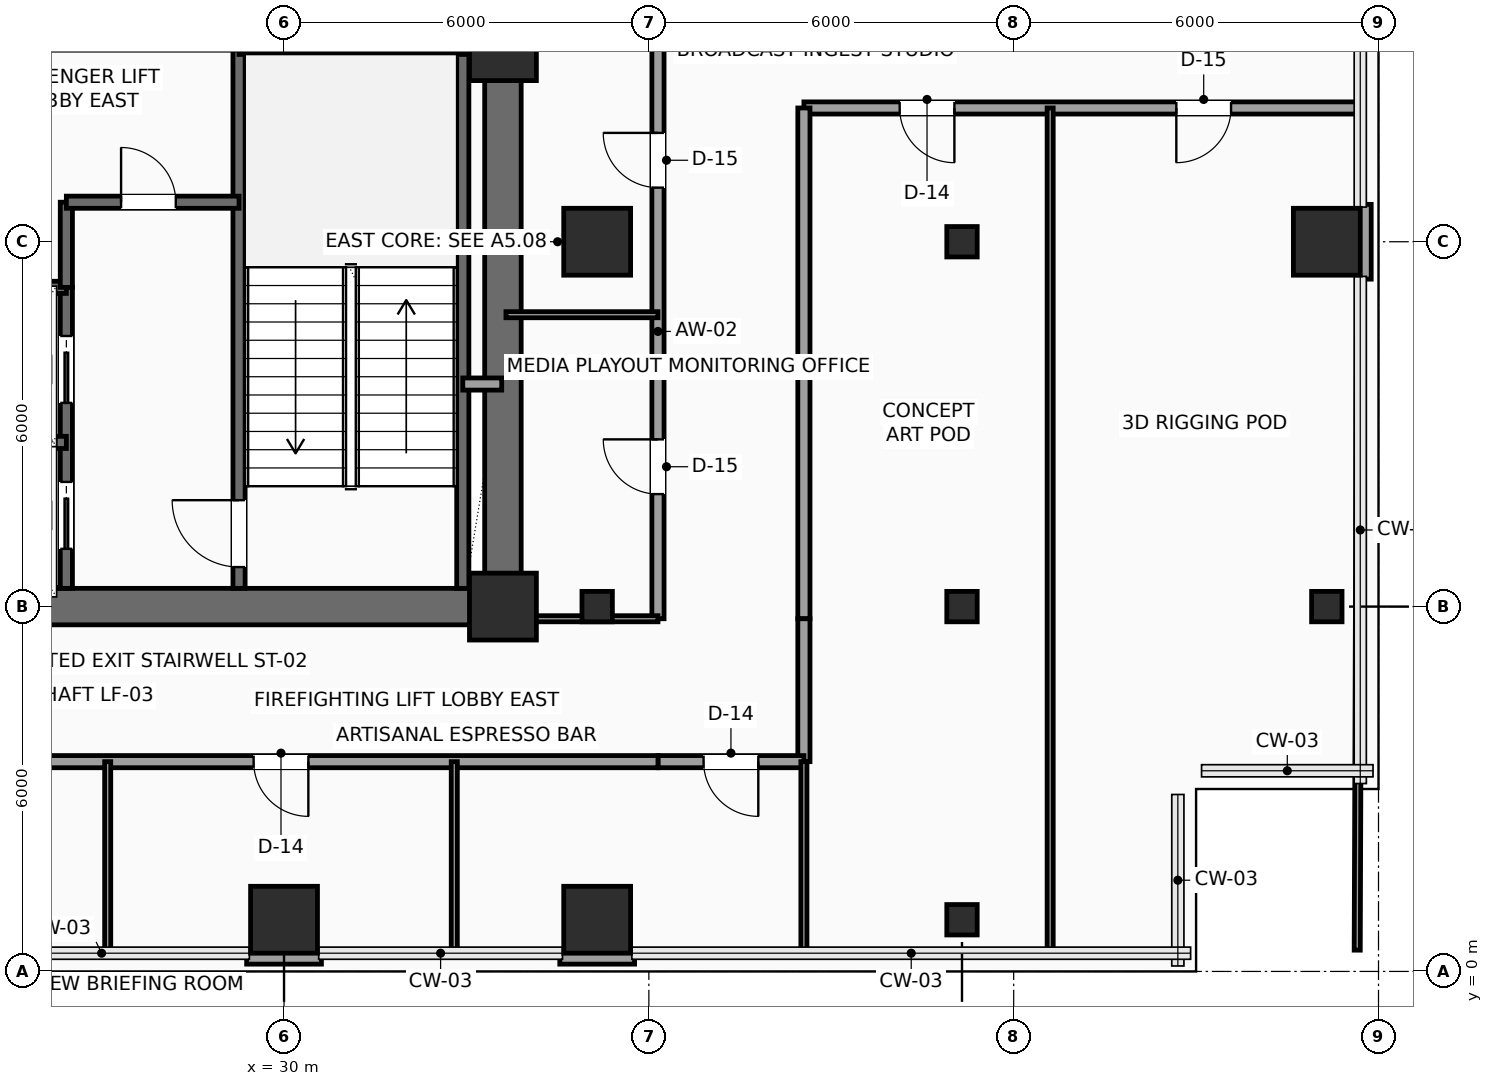
"""IFC4 building model, lengths in metres.
Left out: names, types, materials, properties, quantities, classifications, styles, units other than length and angle.
Written with IfcOpenShell. Run it as: python <this file> out.ifc"""

import sys

from ifc_helpers import new_model, si_unit, direction, frame, frame_2d, origin, origin_2d, place, context, subcontext, project, spatial, rectangle, hollow_rectangle, extrude, element, fill, save


model = new_model("IFC4")
c1 = context("Model", 3, precision=1e-05, world=origin(), true_north=direction((0.0, 1.0)))
c2 = subcontext(c1, "Body", "Model", "MODEL_VIEW")
j1 = project(units=[si_unit("LENGTHUNIT", "METRE"), si_unit("PLANEANGLEUNIT", "RADIAN")], contexts=[c1])
p1 = place(None, origin())
s1 = spatial("IfcSite", under=j1, at=p1, CompositionType="ELEMENT")
p2 = place(p1, origin())
s2 = spatial("IfcBuilding", under=s1, at=p2, CompositionType="ELEMENT")
p3 = place(p2, frame((0.0, 0.0, 141.9)))
s3 = spatial("IfcBuildingStorey", under=s2, at=p3, CompositionType="ELEMENT", Elevation=141.9)
for number, where, z_axis, x_axis in (
    (1, (33.6, 6.0, 0.0), (0.0, 0.0, 1.0), (1.0, 0.0, 0.0)),
    (2, (33.6, 15.2, 0.0), (0.0, 0.0, 1.0), (1.0, 0.0, 0.0)),
    (3, (30.0, 0.85, 0.0), (0.0, 0.0, 1.0), (1.0, 0.0, 0.0)),
    (4, (35.15, 0.85, 0.0), (0.0, 0.0, 1.0), (1.0, 0.0, 0.0)),
):
    element("IfcColumn", number, at=place(p3, frame(where, z_axis=z_axis, x_axis=x_axis)), inside=s3, PredefinedType="COLUMN", context=c2, shape_type="SweptSolid", body=[
        extrude(rectangle(XDim=1.1, YDim=1.1, at=origin_2d()), origin(), (0.0, 0.0, 1.0), 3.75),
    ])
p4 = place(p3, frame((35.15, 6.0, 0.0), z_axis=(0.0, 0.0, 1.0), x_axis=(1.0, 0.0, 0.0)))
e5 = element("IfcColumn", 5, at=p4, inside=s3, PredefinedType="COLUMN", context=c2, shape_type="SweptSolid", body=[
    extrude(hollow_rectangle(XDim=0.5, YDim=0.5, WallThickness=0.025, InnerFilletRadius=0.025, OuterFilletRadius=0.04, at=origin_2d()), origin(), (0.0, 0.0, 1.0), 3.75),
])
p5 = place(p3, frame((35.15, 12.0, 0.0), z_axis=(0.0, 0.0, 1.0), x_axis=(1.0, 0.0, 0.0)))
e6 = element("IfcColumn", 6, at=p5, inside=s3, PredefinedType="COLUMN", context=c2, shape_type="SweptSolid", body=[
    extrude(rectangle(XDim=1.1, YDim=1.1, at=origin_2d()), origin(), (0.0, 0.0, 1.0), 3.75),
])
for number, where, z_axis, x_axis in (
    (7, (41.15, 0.85, 0.0), (0.0, 0.0, 1.0), (1.0, 0.0, 0.0)),
    (8, (41.15, 6.0, 0.0), (0.0, 0.0, 1.0), (1.0, 0.0, 0.0)),
    (9, (41.15, 12.0, 0.0), (0.0, 0.0, 1.0), (1.0, 0.0, 0.0)),
    (10, (47.15, 6.0, 0.0), (0.0, 0.0, 1.0), (1.0, 0.0, 0.0)),
):
    element("IfcColumn", number, at=place(p3, frame(where, z_axis=z_axis, x_axis=x_axis)), inside=s3, PredefinedType="COLUMN", context=c2, shape_type="SweptSolid", body=[
        extrude(hollow_rectangle(XDim=0.5, YDim=0.5, WallThickness=0.025, InnerFilletRadius=0.025, OuterFilletRadius=0.04, at=origin_2d()), origin(), (0.0, 0.0, 1.0), 3.75),
    ])
p6 = place(p3, frame((47.15, 12.0, 0.0), z_axis=(0.0, 0.0, 1.0), x_axis=(1.0, 0.0, 0.0)))
e11 = element("IfcColumn", 11, at=p6, inside=s3, PredefinedType="COLUMN", context=c2, shape_type="SweptSolid", body=[
    extrude(rectangle(XDim=1.1, YDim=1.1, at=origin_2d()), origin(), (0.0, 0.0, 1.0), 3.75),
])
for number, where, z_axis, x_axis in (
    (12, (47.76, 12.615, 0.0), (0.0, 0.0, 1.0), (0.0, -1.0, 0.0)),
    (13, (35.765, 0.24, 0.0), (0.0, 0.0, 1.0), (-1.0, 0.0, 0.0)),
    (14, (30.615, 0.24, 0.0), (0.0, 0.0, 1.0), (-1.0, 0.0, 0.0)),
):
    element("IfcWall", number, at=place(p3, frame(where, z_axis=z_axis, x_axis=x_axis)), inside=s3, PredefinedType="SOLIDWALL", context=c2, shape_type="SweptSolid", body=[
        extrude(rectangle(XDim=1.23, YDim=0.24, at=frame_2d((0.615, 0.0))), origin(), (0.0, 0.0, 1.0), 3.525),
    ])
p7 = place(p3, frame((24.0, 6.0, 0.0), z_axis=(0.0, 0.0, 1.0), x_axis=(1.0, 0.0, 0.0)))
e15 = element("IfcWall", 15, at=p7, inside=s3, PredefinedType="SHEAR", context=c2, shape_type="SweptSolid", body=[
    extrude(rectangle(XDim=9.6, YDim=0.6, at=frame_2d((4.8, 0.0))), origin(), (0.0, 0.0, 1.0), 3.525),
])
p8 = place(p3, frame((33.6, 6.0, 0.0), z_axis=(0.0, 0.0, 1.0), x_axis=(0.0, 1.0, 0.0)))
e16 = element("IfcWall", 16, at=p8, inside=s3, PredefinedType="SHEAR", context=c2, shape_type="SweptSolid", body=[
    extrude(rectangle(XDim=12.0, YDim=0.6, at=frame_2d((6.0, 0.0))), origin(), (0.0, 0.0, 1.0), 3.525),
])
p9 = place(p8, frame((10.15, 0.0, 0.0)))
e17 = element("IfcOpeningElement", 17, at=p9, cuts=e16, PredefinedType="OPENING", context=c2, shape_type="SweptSolid", body=[
    extrude(rectangle(XDim=0.9, YDim=2.15, at=frame_2d((0.45, 1.075))), frame((0.0, 0.31, 0.0), z_axis=(0.0, -1.0, 0.0), x_axis=(1.0, 0.0, 0.0)), (0.0, 0.0, 1.0), 0.62),
])
p10 = place(p3, frame((29.26, 6.3, 0.0), z_axis=(0.0, 0.0, 1.0), x_axis=(0.0, 1.0, 0.0)))
e18 = element("IfcWall", 18, at=p10, inside=s3, PredefinedType="SHEAR", context=c2, shape_type="SweptSolid", body=[
    extrude(rectangle(XDim=8.88, YDim=0.2, at=frame_2d((4.44, 0.0))), origin(), (0.0, 0.0, 1.0), 3.525),
])
p11 = place(p10, frame((0.35, 0.0, 0.0)))
e19 = element("IfcOpeningElement", 19, at=p11, cuts=e18, PredefinedType="OPENING", context=c2, shape_type="SweptSolid", body=[
    extrude(rectangle(XDim=1.1, YDim=2.2, at=frame_2d((0.55, 1.1))), frame((0.0, 0.11, 0.0), z_axis=(0.0, -1.0, 0.0), x_axis=(1.0, 0.0, 0.0)), (0.0, 0.0, 1.0), 0.22),
])
p12 = place(p3, frame((32.94, 6.3, 0.0), z_axis=(0.0, 0.0, 1.0), x_axis=(0.0, 1.0, 0.0)))
e20 = element("IfcWall", 20, at=p12, inside=s3, PredefinedType="SHEAR", context=c2, shape_type="SweptSolid", body=[
    extrude(rectangle(XDim=8.88, YDim=0.2, at=frame_2d((4.44, 0.0))), origin(), (0.0, 0.0, 1.0), 3.525),
])
p13 = place(p3, frame((29.26, 15.18, 0.0), z_axis=(0.0, 0.0, 1.0), x_axis=(1.0, 0.0, 0.0)))
e21 = element("IfcWall", 21, at=p13, inside=s3, PredefinedType="SHEAR", context=c2, shape_type="SweptSolid", body=[
    extrude(rectangle(XDim=4.04, YDim=0.2, at=frame_2d((2.02, 0.0))), origin(), (0.0, 0.0, 1.0), 3.525),
])
p14 = place(p3, frame((26.42, 6.3, 0.0), z_axis=(0.0, 0.0, 1.0), x_axis=(0.0, 1.0, 0.0)))
e22 = element("IfcWall", 22, at=p14, inside=s3, PredefinedType="SHEAR", context=c2, shape_type="SweptSolid", body=[
    extrude(rectangle(XDim=4.95, YDim=0.2, at=frame_2d((2.475, 0.0))), origin(), (0.0, 0.0, 1.0), 3.525),
])
p15 = place(p14, frame((0.65, 0.0, 0.0)))
e23 = element("IfcOpeningElement", 23, at=p15, cuts=e22, PredefinedType="OPENING", context=c2, shape_type="SweptSolid", body=[
    extrude(rectangle(XDim=1.1, YDim=2.2, at=frame_2d((0.55, 1.1))), frame((0.0, 0.11, 0.0), z_axis=(0.0, -1.0, 0.0), x_axis=(1.0, 0.0, 0.0)), (0.0, 0.0, 1.0), 0.22),
])
p16 = place(p14, frame((3.05, 0.0, 0.0)))
e24 = element("IfcOpeningElement", 24, at=p16, cuts=e22, PredefinedType="OPENING", context=c2, shape_type="SweptSolid", body=[
    extrude(rectangle(XDim=1.1, YDim=2.2, at=frame_2d((0.55, 1.1))), frame((0.0, 0.11, 0.0), z_axis=(0.0, -1.0, 0.0), x_axis=(1.0, 0.0, 0.0)), (0.0, 0.0, 1.0), 0.22),
])
for number, where, z_axis, x_axis in (
    (25, (24.25, 8.7, 0.0), (0.0, 0.0, 1.0), (1.0, 0.0, 0.0)),
    (26, (24.25, 11.25, 0.0), (0.0, 0.0, 1.0), (1.0, 0.0, 0.0)),
):
    element("IfcWall", number, at=place(p3, frame(where, z_axis=z_axis, x_axis=x_axis)), inside=s3, PredefinedType="SHEAR", context=c2, shape_type="SweptSolid", body=[
        extrude(rectangle(XDim=2.17, YDim=0.2, at=frame_2d((1.085, 0.0))), origin(), (0.0, 0.0, 1.0), 3.525),
    ])
p17 = place(p3, frame((26.42, 11.25, 0.0), z_axis=(0.0, 0.0, 1.0), x_axis=(0.0, 1.0, 0.0)))
e27 = element("IfcWall", 27, at=p17, inside=s3, PredefinedType="SHEAR", context=c2, shape_type="SweptSolid", body=[
    extrude(rectangle(XDim=1.4, YDim=0.2, at=frame_2d((0.7, 0.0))), origin(), (0.0, 0.0, 1.0), 3.525),
])
p18 = place(p3, frame((26.42, 12.65, 0.0), z_axis=(0.0, 0.0, 1.0), x_axis=(1.0, 0.0, 0.0)))
e28 = element("IfcWall", 28, at=p18, inside=s3, PredefinedType="SHEAR", context=c2, shape_type="SweptSolid", body=[
    extrude(rectangle(XDim=2.84, YDim=0.2, at=frame_2d((1.42, 0.0))), origin(), (0.0, 0.0, 1.0), 3.525),
])
p19 = place(p18, frame((0.9, 0.0, 0.0)))
e29 = element("IfcOpeningElement", 29, at=p19, cuts=e28, PredefinedType="OPENING", context=c2, shape_type="SweptSolid", body=[
    extrude(rectangle(XDim=0.9, YDim=2.15, at=frame_2d((0.45, 1.075))), frame((0.0, 0.11, 0.0), z_axis=(0.0, -1.0, 0.0), x_axis=(1.0, 0.0, 0.0)), (0.0, 0.0, 1.0), 0.22),
])
p20 = place(p3, frame((32.94, 9.66, 0.0), z_axis=(0.0, 0.0, 1.0), x_axis=(1.0, 0.0, 0.0)))
e30 = element("IfcWall", 30, at=p20, inside=s3, PredefinedType="SOLIDWALL", context=c2, shape_type="SweptSolid", body=[
    extrude(rectangle(XDim=0.64, YDim=0.2, at=frame_2d((0.32, 0.0))), origin(), (0.0, 0.0, 1.0), 3.525),
])
p21 = place(p3, frame((36.15, 5.8, 0.0), z_axis=(0.0, 0.0, 1.0), x_axis=(0.0, 1.0, 0.0)))
e31 = element("IfcWall", 31, at=p21, inside=s3, PredefinedType="PARTITIONING", context=c2, shape_type="SweptSolid", body=[
    extrude(rectangle(XDim=10.08, YDim=0.2, at=frame_2d((5.04, 0.0))), origin(), (0.0, 0.0, 1.0), 3.525),
])
p22 = place(p21, frame((2.05, 0.0, 0.0)))
e32 = element("IfcOpeningElement", 32, at=p22, cuts=e31, PredefinedType="OPENING", context=c2, shape_type="SweptSolid", body=[
    extrude(rectangle(XDim=0.9, YDim=2.1, at=frame_2d((0.45, 1.05))), frame((0.0, 0.11, 0.0), z_axis=(0.0, -1.0, 0.0), x_axis=(1.0, 0.0, 0.0)), (0.0, 0.0, 1.0), 0.22),
])
p23 = place(p21, frame((7.09, 0.0, 0.0)))
e33 = element("IfcOpeningElement", 33, at=p23, cuts=e31, PredefinedType="OPENING", context=c2, shape_type="SweptSolid", body=[
    extrude(rectangle(XDim=0.9, YDim=2.1, at=frame_2d((0.45, 1.05))), frame((0.0, 0.11, 0.0), z_axis=(0.0, -1.0, 0.0), x_axis=(1.0, 0.0, 0.0)), (0.0, 0.0, 1.0), 0.22),
])
p24 = place(p3, frame((47.7, 14.2, 0.0), z_axis=(0.0, 0.0, 1.0), x_axis=(-1.0, 0.0, 0.0)))
e34 = element("IfcWall", 34, at=p24, inside=s3, PredefinedType="PARTITIONING", context=c2, shape_type="SweptSolid", body=[
    extrude(rectangle(XDim=9.15, YDim=0.2, at=frame_2d((4.575, 0.0))), origin(), (0.0, 0.0, 1.0), 3.525),
])
p25 = place(p24, frame((6.675, 0.0, 0.0)))
e35 = element("IfcOpeningElement", 35, at=p25, cuts=e34, PredefinedType="OPENING", context=c2, shape_type="SweptSolid", body=[
    extrude(rectangle(XDim=0.9, YDim=2.1, at=frame_2d((0.45, 1.05))), frame((0.0, 0.11, 0.0), z_axis=(0.0, -1.0, 0.0), x_axis=(1.0, 0.0, 0.0)), (0.0, 0.0, 1.0), 0.22),
])
p26 = place(p24, frame((2.125, 0.0, 0.0)))
e36 = element("IfcOpeningElement", 36, at=p26, cuts=e34, PredefinedType="OPENING", context=c2, shape_type="SweptSolid", body=[
    extrude(rectangle(XDim=0.9, YDim=2.1, at=frame_2d((0.45, 1.05))), frame((0.0, 0.11, 0.0), z_axis=(0.0, -1.0, 0.0), x_axis=(1.0, 0.0, 0.0)), (0.0, 0.0, 1.0), 0.22),
])
p27 = place(p3, frame((38.55, 14.2, 0.0), z_axis=(0.0, 0.0, 1.0), x_axis=(0.0, -1.0, 0.0)))
e37 = element("IfcWall", 37, at=p27, inside=s3, PredefinedType="PARTITIONING", context=c2, shape_type="SweptSolid", body=[
    extrude(rectangle(XDim=8.4, YDim=0.2, at=frame_2d((4.2, 0.0))), origin(), (0.0, 0.0, 1.0), 3.525),
])
p28 = place(p3, frame((38.55, 5.8, 0.0), z_axis=(0.0, 0.0, 1.0), x_axis=(0.0, -1.0, 0.0)))
e38 = element("IfcWall", 38, at=p28, inside=s3, PredefinedType="PARTITIONING", context=c2, shape_type="SweptSolid", body=[
    extrude(rectangle(XDim=2.35, YDim=0.2, at=frame_2d((1.175, 0.0))), origin(), (0.0, 0.0, 1.0), 3.525),
])
p29 = place(p3, frame((38.55, 3.45, 0.0), z_axis=(0.0, 0.0, 1.0), x_axis=(-1.0, 0.0, 0.0)))
e39 = element("IfcWall", 39, at=p29, inside=s3, PredefinedType="PARTITIONING", context=c2, shape_type="SweptSolid", body=[
    extrude(rectangle(XDim=2.4, YDim=0.2, at=frame_2d((1.2, 0.0))), origin(), (0.0, 0.0, 1.0), 3.067),
])
p30 = place(p29, frame((0.75, 0.0, 0.0)))
e40 = element("IfcOpeningElement", 40, at=p30, cuts=e39, PredefinedType="OPENING", context=c2, shape_type="SweptSolid", body=[
    extrude(rectangle(XDim=0.9, YDim=2.1, at=frame_2d((0.45, 1.05))), frame((0.0, 0.11, 0.0), z_axis=(0.0, -1.0, 0.0), x_axis=(1.0, 0.0, 0.0)), (0.0, 0.0, 1.0), 0.22),
])
p31 = place(p3, frame((36.15, 3.45, 0.0), z_axis=(0.0, 0.0, 1.0), x_axis=(-1.0, 0.0, 0.0)))
e41 = element("IfcWall", 41, at=p31, inside=s3, PredefinedType="PARTITIONING", context=c2, shape_type="SweptSolid", body=[
    extrude(rectangle(XDim=12.2, YDim=0.2, at=frame_2d((6.1, 0.0))), origin(), (0.0, 0.0, 1.0), 3.067),
])
p32 = place(p31, frame((10.175, 0.0, 0.0)))
e42 = element("IfcOpeningElement", 42, at=p32, cuts=e41, PredefinedType="OPENING", context=c2, shape_type="SweptSolid", body=[
    extrude(rectangle(XDim=0.9, YDim=2.1, at=frame_2d((0.45, 1.05))), frame((0.0, 0.11, 0.0), z_axis=(0.0, -1.0, 0.0), x_axis=(1.0, 0.0, 0.0)), (0.0, 0.0, 1.0), 0.22),
])
p33 = place(p31, frame((5.75, 0.0, 0.0)))
e43 = element("IfcOpeningElement", 43, at=p33, cuts=e41, PredefinedType="OPENING", context=c2, shape_type="SweptSolid", body=[
    extrude(rectangle(XDim=0.9, YDim=2.1, at=frame_2d((0.45, 1.05))), frame((0.0, 0.11, 0.0), z_axis=(0.0, -1.0, 0.0), x_axis=(1.0, 0.0, 0.0)), (0.0, 0.0, 1.0), 0.22),
])
for number, where, z_axis, x_axis in (
    (44, (27.1, 0.3, 0.0), (0.0, 0.0, 1.0), (0.0, 1.0, 0.0)),
    (45, (32.8, 0.3, 0.0), (0.0, 0.0, 1.0), (0.0, 1.0, 0.0)),
    (46, (38.55, 0.3, 0.0), (0.0, 0.0, 1.0), (0.0, 1.0, 0.0)),
):
    element("IfcWall", number, at=place(p3, frame(where, z_axis=z_axis, x_axis=x_axis)), inside=s3, PredefinedType="PARTITIONING", context=c2, shape_type="SweptSolid", body=[
        extrude(rectangle(XDim=3.15, YDim=0.1, at=frame_2d((1.575, 0.0))), origin(), (0.0, 0.0, 1.0), 3.525),
    ])
p34 = place(p3, frame((33.65, 5.8, 0.0), z_axis=(0.0, 0.0, 1.0), x_axis=(1.0, 0.0, 0.0)))
e47 = element("IfcWall", 47, at=p34, inside=s3, PredefinedType="PARTITIONING", context=c2, shape_type="SweptSolid", body=[
    extrude(rectangle(XDim=2.5, YDim=0.1, at=frame_2d((1.25, 0.0))), origin(), (0.0, 0.0, 1.0), 3.017),
])
p35 = place(p3, frame((33.65, 10.8, 0.0), z_axis=(0.0, 0.0, 1.0), x_axis=(1.0, 0.0, 0.0)))
e48 = element("IfcWall", 48, at=p35, inside=s3, PredefinedType="PARTITIONING", context=c2, shape_type="SweptSolid", body=[
    extrude(rectangle(XDim=2.5, YDim=0.1, at=frame_2d((1.25, 0.0))), origin(), (0.0, 0.0, 1.0), 3.525),
])
p36 = place(p3, frame((42.6, 0.3, 0.0), z_axis=(0.0, 0.0, 1.0), x_axis=(0.0, 1.0, 0.0)))
e49 = element("IfcWall", 49, at=p36, inside=s3, PredefinedType="PARTITIONING", context=c2, shape_type="SweptSolid", body=[
    extrude(rectangle(XDim=13.9, YDim=0.1, at=frame_2d((6.95, 0.0))), origin(), (0.0, 0.0, 1.0), 3.525),
])
p37 = place(p3, frame((47.65, 0.35, 0.0), z_axis=(0.0, 0.0, 1.0), x_axis=(0.003606251025, 0.999993497456, 0.0)))
e50 = element("IfcWall", 50, at=p37, inside=s3, PredefinedType="PARTITIONING", context=c2, shape_type="SweptSolid", body=[
    extrude(rectangle(XDim=11.035, YDim=0.1, at=frame_2d((5.518, 0.0))), origin(), (0.0, 0.0, 1.0), 3.525),
])
p38 = place(p3, frame((47.694, 12.615, 0.0), z_axis=(0.0, 0.0, 1.0), x_axis=(0.003542799701, 0.999993724265, 0.0)))
e51 = element("IfcWall", 51, at=p38, inside=s3, PredefinedType="PARTITIONING", context=c2, shape_type="SweptSolid", body=[
    extrude(rectangle(XDim=1.585, YDim=0.1, at=frame_2d((0.792, 0.0))), origin(), (0.0, 0.0, 1.0), 3.525),
])
p39 = place(p11, origin())
e52 = element("IfcDoor", 52, at=p39, inside=s3, OperationType="SINGLE_SWING_RIGHT", PredefinedType="DOOR", context=c2, shape_type="SweptSolid", body=[
    extrude(rectangle(XDim=1.1, YDim=2.2, at=frame_2d((0.55, 1.1))), frame((0.0, 0.025, 0.0), z_axis=(0.0, -1.0, 0.0), x_axis=(1.0, 0.0, 0.0)), (0.0, 0.0, 1.0), 0.05),
])
fill(e19, e52)
p40 = place(p15, origin())
e53 = element("IfcDoor", 53, at=p40, inside=s3, OperationType="SLIDING_TO_LEFT", PredefinedType="DOOR", context=c2, shape_type="SweptSolid", body=[
    extrude(rectangle(XDim=1.1, YDim=2.2, at=frame_2d((0.55, 1.1))), frame((0.0, 0.025, 0.0), z_axis=(0.0, -1.0, 0.0), x_axis=(1.0, 0.0, 0.0)), (0.0, 0.0, 1.0), 0.05),
])
fill(e23, e53)
p41 = place(p16, origin())
e54 = element("IfcDoor", 54, at=p41, inside=s3, OperationType="SLIDING_TO_LEFT", PredefinedType="DOOR", context=c2, shape_type="SweptSolid", body=[
    extrude(rectangle(XDim=1.1, YDim=2.2, at=frame_2d((0.55, 1.1))), frame((0.0, 0.025, 0.0), z_axis=(0.0, -1.0, 0.0), x_axis=(1.0, 0.0, 0.0)), (0.0, 0.0, 1.0), 0.05),
])
fill(e24, e54)
p42 = place(p19, origin())
e55 = element("IfcDoor", 55, at=p42, inside=s3, OperationType="SINGLE_SWING_LEFT", PredefinedType="DOOR", context=c2, shape_type="SweptSolid", body=[
    extrude(rectangle(XDim=0.9, YDim=2.15, at=frame_2d((0.45, 1.075))), frame((0.0, 0.025, 0.0), z_axis=(0.0, -1.0, 0.0), x_axis=(1.0, 0.0, 0.0)), (0.0, 0.0, 1.0), 0.05),
])
fill(e29, e55)
p43 = place(p22, origin())
e56 = element("IfcDoor", 56, at=p43, inside=s3, OperationType="SINGLE_SWING_RIGHT", PredefinedType="DOOR", context=c2, shape_type="SweptSolid", body=[
    extrude(rectangle(XDim=0.9, YDim=2.1, at=frame_2d((0.45, 1.05))), frame((0.0, 0.025, 0.0), z_axis=(0.0, -1.0, 0.0), x_axis=(1.0, 0.0, 0.0)), (0.0, 0.0, 1.0), 0.05),
])
fill(e32, e56)
p44 = place(p23, origin())
e57 = element("IfcDoor", 57, at=p44, inside=s3, OperationType="SINGLE_SWING_RIGHT", PredefinedType="DOOR", context=c2, shape_type="SweptSolid", body=[
    extrude(rectangle(XDim=0.9, YDim=2.1, at=frame_2d((0.45, 1.05))), frame((0.0, 0.025, 0.0), z_axis=(0.0, -1.0, 0.0), x_axis=(1.0, 0.0, 0.0)), (0.0, 0.0, 1.0), 0.05),
])
fill(e33, e57)
p45 = place(p25, origin())
e58 = element("IfcDoor", 58, at=p45, inside=s3, OperationType="SINGLE_SWING_LEFT", PredefinedType="DOOR", context=c2, shape_type="SweptSolid", body=[
    extrude(rectangle(XDim=0.9, YDim=2.1, at=frame_2d((0.45, 1.05))), frame((0.0, 0.025, 0.0), z_axis=(0.0, -1.0, 0.0), x_axis=(1.0, 0.0, 0.0)), (0.0, 0.0, 1.0), 0.05),
])
fill(e35, e58)
p46 = place(p26, origin())
e59 = element("IfcDoor", 59, at=p46, inside=s3, OperationType="SINGLE_SWING_RIGHT", PredefinedType="DOOR", context=c2, shape_type="SweptSolid", body=[
    extrude(rectangle(XDim=0.9, YDim=2.1, at=frame_2d((0.45, 1.05))), frame((0.0, 0.025, 0.0), z_axis=(0.0, -1.0, 0.0), x_axis=(1.0, 0.0, 0.0)), (0.0, 0.0, 1.0), 0.05),
])
fill(e36, e59)
p47 = place(p30, origin())
e60 = element("IfcDoor", 60, at=p47, inside=s3, OperationType="SINGLE_SWING_LEFT", PredefinedType="DOOR", context=c2, shape_type="SweptSolid", body=[
    extrude(rectangle(XDim=0.9, YDim=2.1, at=frame_2d((0.45, 1.05))), frame((0.0, 0.025, 0.0), z_axis=(0.0, -1.0, 0.0), x_axis=(1.0, 0.0, 0.0)), (0.0, 0.0, 1.0), 0.05),
])
fill(e40, e60)
p48 = place(p33, origin())
e61 = element("IfcDoor", 61, at=p48, inside=s3, OperationType="SINGLE_SWING_LEFT", PredefinedType="DOOR", context=c2, shape_type="SweptSolid", body=[
    extrude(rectangle(XDim=0.9, YDim=2.1, at=frame_2d((0.45, 1.05))), frame((0.0, 0.025, 0.0), z_axis=(0.0, -1.0, 0.0), x_axis=(1.0, 0.0, 0.0)), (0.0, 0.0, 1.0), 0.05),
])
fill(e43, e61)
save(model, sys.argv[1])
